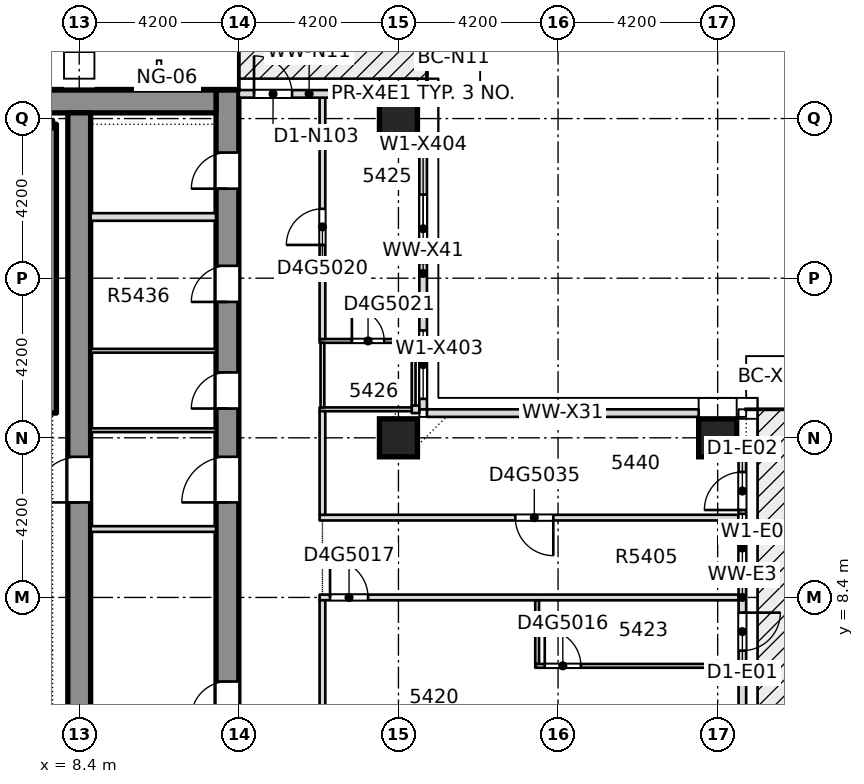
"""IFC4 building model, lengths in metres.
Left out: names, types, materials, properties, quantities, classifications, styles, units other than length and angle.
Written with IfcOpenShell. Run it as: python <this file> out.ifc"""

import sys

from ifc_helpers import new_model, si_unit, direction, frame, frame_2d, origin, origin_2d, place, context, subcontext, project, spatial, rectangle, extrude, element, fill, save


model = new_model("IFC4")
c1 = context("Model", 3, precision=1e-05, world=origin(), true_north=direction((0.0, 1.0)))
c2 = subcontext(c1, "Body", "Model", "MODEL_VIEW")
j1 = project(units=[si_unit("LENGTHUNIT", "METRE"), si_unit("PLANEANGLEUNIT", "RADIAN")], contexts=[c1])
p1 = place(None, origin())
s1 = spatial("IfcSite", under=j1, at=p1, CompositionType="ELEMENT")
p2 = place(p1, origin())
s2 = spatial("IfcBuilding", under=s1, at=p2, CompositionType="ELEMENT")
p3 = place(p2, frame((0.0, 0.0, 206.6)))
s3 = spatial("IfcBuildingStorey", under=s2, at=p3, CompositionType="ELEMENT", Elevation=206.6)
p4 = place(p3, frame((12.3, -8.4, -0.4), z_axis=(0.0, 0.0, 1.0), x_axis=(0.0, 1.0, 0.0)))
e1 = element("IfcWall", 1, at=p4, inside=s3, PredefinedType="SHEAR", context=c2, shape_type="SweptSolid", body=[
    extrude(rectangle(XDim=30.15, YDim=0.6, at=frame_2d((15.075, 0.0))), origin(), (0.0, 0.0, 1.0), 3.45),
])
p5 = place(p4, frame((4.788, 0.0, 0.4)))
e2 = element("IfcOpeningElement", 2, at=p5, cuts=e1, PredefinedType="OPENING", context=c2, shape_type="SweptSolid", body=[
    extrude(rectangle(XDim=0.95, YDim=2.1, at=frame_2d((0.475, 1.05))), frame((0.0, 0.31, 0.0), z_axis=(0.0, -1.0, 0.0), x_axis=(1.0, 0.0, 0.0)), (0.0, 0.0, 1.0), 0.62),
])
p6 = place(p4, frame((13.638, 0.0, 0.4)))
e3 = element("IfcOpeningElement", 3, at=p6, cuts=e1, PredefinedType="OPENING", context=c2, shape_type="SweptSolid", body=[
    extrude(rectangle(XDim=0.95, YDim=2.1, at=frame_2d((0.475, 1.05))), frame((0.0, 0.31, 0.0), z_axis=(0.0, -1.0, 0.0), x_axis=(1.0, 0.0, 0.0)), (0.0, 0.0, 1.0), 0.62),
])
p7 = place(p4, frame((21.771, 0.0, 0.4)))
e4 = element("IfcOpeningElement", 4, at=p7, cuts=e1, PredefinedType="OPENING", context=c2, shape_type="SweptSolid", body=[
    extrude(rectangle(XDim=0.95, YDim=2.1, at=frame_2d((0.475, 1.05))), frame((0.0, 0.31, 0.0), z_axis=(0.0, -1.0, 0.0), x_axis=(1.0, 0.0, 0.0)), (0.0, 0.0, 1.0), 0.62),
])
p8 = place(p4, frame((24.576, 0.0, 0.4)))
e5 = element("IfcOpeningElement", 5, at=p8, cuts=e1, PredefinedType="OPENING", context=c2, shape_type="SweptSolid", body=[
    extrude(rectangle(XDim=0.95, YDim=2.1, at=frame_2d((0.475, 1.05))), frame((0.0, 0.31, 0.0), z_axis=(0.0, -1.0, 0.0), x_axis=(1.0, 0.0, 0.0)), (0.0, 0.0, 1.0), 0.62),
])
p9 = place(p4, frame((27.555, 0.0, 0.4)))
e6 = element("IfcOpeningElement", 6, at=p9, cuts=e1, PredefinedType="OPENING", context=c2, shape_type="SweptSolid", body=[
    extrude(rectangle(XDim=0.95, YDim=2.1, at=frame_2d((0.475, 1.05))), frame((0.0, 0.31, 0.0), z_axis=(0.0, -1.0, 0.0), x_axis=(1.0, 0.0, 0.0)), (0.0, 0.0, 1.0), 0.62),
])
p10 = place(p4, frame((19.3, 0.0, 0.4)))
e7 = element("IfcOpeningElement", 7, at=p10, cuts=e1, PredefinedType="OPENING", context=c2, shape_type="SweptSolid", body=[
    extrude(rectangle(XDim=1.2, YDim=2.1, at=frame_2d((0.6, 1.05))), frame((0.0, 0.31, 0.0), z_axis=(0.0, -1.0, 0.0), x_axis=(1.0, 0.0, 0.0)), (0.0, 0.0, 1.0), 0.62),
])
p11 = place(p3, frame((-12.0, 21.45, -0.4), z_axis=(0.0, 0.0, 1.0), x_axis=(1.0, 0.0, 0.0)))
e8 = element("IfcWall", 8, at=p11, inside=s3, PredefinedType="SHEAR", context=c2, shape_type="SweptSolid", body=[
    extrude(rectangle(XDim=24.0, YDim=0.6, at=frame_2d((12.0, 0.0))), origin(), (0.0, 0.0, 1.0), 3.45),
])
p12 = place(p3, frame((8.4, -7.8, -0.4), z_axis=(0.0, 0.0, 1.0), x_axis=(0.0, 1.0, 0.0)))
e9 = element("IfcWall", 9, at=p12, inside=s3, PredefinedType="SHEAR", context=c2, shape_type="SweptSolid", body=[
    extrude(rectangle(XDim=28.95, YDim=0.6, at=frame_2d((14.475, 0.0))), origin(), (0.0, 0.0, 1.0), 3.45),
])
p13 = place(p12, frame((18.7, 0.0, 0.4)))
e10 = element("IfcOpeningElement", 10, at=p13, cuts=e9, PredefinedType="OPENING", context=c2, shape_type="SweptSolid", body=[
    extrude(rectangle(XDim=1.2, YDim=2.1, at=frame_2d((0.6, 1.05))), frame((0.0, 0.31, 0.0), z_axis=(0.0, -1.0, 0.0), x_axis=(1.0, 0.0, 0.0)), (0.0, 0.0, 1.0), 0.62),
])
for number, where, z_axis, x_axis in (
    (11, (16.8, 12.6, -0.4), (0.0, 0.0, 1.0), (1.0, 0.0, 0.0)),
    (12, (25.2, 12.6, -0.4), (0.0, 0.0, 1.0), (1.0, 0.0, 0.0)),
    (13, (16.8, 21.0, -0.4), (0.0, 0.0, 1.0), (1.0, 0.0, 0.0)),
):
    element("IfcColumn", number, at=place(p3, frame(where, z_axis=z_axis, x_axis=x_axis)), inside=s3, PredefinedType="COLUMN", context=c2, shape_type="SweptSolid", body=[
        extrude(rectangle(XDim=1.0, YDim=1.0, at=origin_2d()), origin(), (0.0, 0.0, 1.0), 3.45),
    ])
p14 = place(p3, frame((20.4, 6.6, 0.0), z_axis=(0.0, 0.0, 1.0), x_axis=(1.0, 0.0, 0.0)))
e14 = element("IfcWall", 14, at=p14, inside=s3, PredefinedType="PARTITIONING", context=c2, shape_type="SweptSolid", body=[
    extrude(rectangle(XDim=5.35, YDim=0.1, at=frame_2d((2.675, 0.0))), origin(), (0.0, 0.0, 1.0), 3.05),
])
p15 = place(p14, frame((0.25, 0.0, 0.0)))
e15 = element("IfcOpeningElement", 15, at=p15, cuts=e14, PredefinedType="OPENING", context=c2, shape_type="SweptSolid", body=[
    extrude(rectangle(XDim=0.95, YDim=2.1, at=frame_2d((0.475, 1.05))), frame((0.0, 0.06, 0.0), z_axis=(0.0, -1.0, 0.0), x_axis=(1.0, 0.0, 0.0)), (0.0, 0.0, 1.0), 0.12),
])
p16 = place(p3, frame((14.725, 8.4, 0.0), z_axis=(0.0, 0.0, 1.0), x_axis=(1.0, 0.0, 0.0)))
e16 = element("IfcWall", 16, at=p16, inside=s3, PredefinedType="PARTITIONING", context=c2, shape_type="SweptSolid", body=[
    extrude(rectangle(XDim=11.025, YDim=0.15, at=frame_2d((5.512, 0.0))), origin(), (0.0, 0.0, 1.0), 3.05),
])
p17 = place(p16, frame((0.275, 0.0, 0.0)))
e17 = element("IfcOpeningElement", 17, at=p17, cuts=e16, PredefinedType="OPENING", context=c2, shape_type="SweptSolid", body=[
    extrude(rectangle(XDim=1.0, YDim=2.1, at=frame_2d((0.5, 1.05))), frame((0.0, 0.085, 0.0), z_axis=(0.0, -1.0, 0.0), x_axis=(1.0, 0.0, 0.0)), (0.0, 0.0, 1.0), 0.17),
])
p18 = place(p3, frame((14.725, 10.5, 0.0), z_axis=(0.0, 0.0, 1.0), x_axis=(1.0, 0.0, 0.0)))
e18 = element("IfcWall", 18, at=p18, inside=s3, PredefinedType="PARTITIONING", context=c2, shape_type="SweptSolid", body=[
    extrude(rectangle(XDim=11.025, YDim=0.15, at=frame_2d((5.512, 0.0))), origin(), (0.0, 0.0, 1.0), 3.05),
])
p19 = place(p18, frame((5.15, 0.0, 0.0)))
e19 = element("IfcOpeningElement", 19, at=p19, cuts=e18, PredefinedType="OPENING", context=c2, shape_type="SweptSolid", body=[
    extrude(rectangle(XDim=1.0, YDim=2.1, at=frame_2d((0.5, 1.05))), frame((0.0, 0.085, 0.0), z_axis=(0.0, -1.0, 0.0), x_axis=(1.0, 0.0, 0.0)), (0.0, 0.0, 1.0), 0.17),
])
p20 = place(p3, frame((14.725, 13.35, 0.0), z_axis=(0.0, 0.0, 1.0), x_axis=(1.0, 0.0, 0.0)))
e20 = element("IfcWall", 20, at=p20, inside=s3, PredefinedType="PARTITIONING", context=c2, shape_type="SweptSolid", body=[
    extrude(rectangle(XDim=2.525, YDim=0.1, at=frame_2d((1.262, 0.0))), origin(), (0.0, 0.0, 1.0), 3.05),
])
p21 = place(p3, frame((17.15, 13.35, 0.0), z_axis=(0.0, 0.0, 1.0), x_axis=(1.0, 0.0, 0.0)))
e21 = element("IfcWall", 21, at=p21, inside=s3, PredefinedType="PARTITIONING", context=c2, shape_type="SweptSolid", body=[
    extrude(rectangle(XDim=0.2, YDim=0.2, at=frame_2d((0.1, 0.0))), origin(), (0.0, 0.0, 1.0), 3.05),
])
p22 = place(p3, frame((14.725, 15.15, 0.0), z_axis=(0.0, 0.0, 1.0), x_axis=(1.0, 0.0, 0.0)))
e22 = element("IfcWall", 22, at=p22, inside=s3, PredefinedType="PARTITIONING", context=c2, shape_type="SweptSolid", body=[
    extrude(rectangle(XDim=2.525, YDim=0.1, at=frame_2d((1.262, 0.0))), origin(), (0.0, 0.0, 1.0), 3.05),
])
p23 = place(p22, frame((0.85, 0.0, 0.0)))
e23 = element("IfcOpeningElement", 23, at=p23, cuts=e22, PredefinedType="OPENING", context=c2, shape_type="SweptSolid", body=[
    extrude(rectangle(XDim=0.85, YDim=2.1, at=frame_2d((0.425, 1.05))), frame((0.0, 0.06, 0.0), z_axis=(0.0, -1.0, 0.0), x_axis=(1.0, 0.0, 0.0)), (0.0, 0.0, 1.0), 0.12),
])
p24 = place(p3, frame((14.8, -10.18, 0.0), z_axis=(0.0, 0.0, 1.0), x_axis=(0.0, 1.0, 0.0)))
e24 = element("IfcWall", 24, at=p24, inside=s3, PredefinedType="PARTITIONING", context=c2, shape_type="SweptSolid", body=[
    extrude(rectangle(XDim=18.505, YDim=0.15, at=frame_2d((9.252, 0.0))), origin(), (0.0, 0.0, 1.0), 3.05),
])
p25 = place(p24, frame((0.63, 0.0, 0.0)))
e25 = element("IfcOpeningElement", 25, at=p25, cuts=e24, PredefinedType="OPENING", context=c2, shape_type="SweptSolid", body=[
    extrude(rectangle(XDim=0.95, YDim=2.1, at=frame_2d((0.475, 1.05))), frame((0.0, 0.085, 0.0), z_axis=(0.0, -1.0, 0.0), x_axis=(1.0, 0.0, 0.0)), (0.0, 0.0, 1.0), 0.17),
])
p26 = place(p24, frame((9.63, 0.0, 0.0)))
e26 = element("IfcOpeningElement", 26, at=p26, cuts=e24, PredefinedType="OPENING", context=c2, shape_type="SweptSolid", body=[
    extrude(rectangle(XDim=1.1, YDim=2.1, at=frame_2d((0.55, 1.05))), frame((0.0, 0.085, 0.0), z_axis=(0.0, -1.0, 0.0), x_axis=(1.0, 0.0, 0.0)), (0.0, 0.0, 1.0), 0.17),
])
p27 = place(p24, frame((4.48, 0.0, 0.0)))
e27 = element("IfcOpeningElement", 27, at=p27, cuts=e24, PredefinedType="OPENING", context=c2, shape_type="SweptSolid", body=[
    extrude(rectangle(XDim=1.0, YDim=2.1, at=frame_2d((0.5, 1.05))), frame((0.0, 0.085, 0.0), z_axis=(0.0, -1.0, 0.0), x_axis=(1.0, 0.0, 0.0)), (0.0, 0.0, 1.0), 0.17),
])
p28 = place(p3, frame((14.8, 10.575, 0.0), z_axis=(0.0, 0.0, 1.0), x_axis=(0.0, 1.0, 0.0)))
e28 = element("IfcWall", 28, at=p28, inside=s3, PredefinedType="PARTITIONING", context=c2, shape_type="SweptSolid", body=[
    extrude(rectangle(XDim=2.725, YDim=0.15, at=frame_2d((1.363, 0.0))), origin(), (0.0, 0.0, 1.0), 3.05),
])
p29 = place(p3, frame((14.8, 13.4, 0.0), z_axis=(0.0, 0.0, 1.0), x_axis=(0.0, 1.0, 0.0)))
e29 = element("IfcWall", 29, at=p29, inside=s3, PredefinedType="PARTITIONING", context=c2, shape_type="SweptSolid", body=[
    extrude(rectangle(XDim=1.7, YDim=0.1, at=frame_2d((0.85, 0.0))), origin(), (0.0, 0.0, 1.0), 3.05),
])
p30 = place(p3, frame((14.8, 15.2, 0.0), z_axis=(0.0, 0.0, 1.0), x_axis=(0.0, 1.0, 0.0)))
e30 = element("IfcWall", 30, at=p30, inside=s3, PredefinedType="PARTITIONING", context=c2, shape_type="SweptSolid", body=[
    extrude(rectangle(XDim=6.35, YDim=0.15, at=frame_2d((3.175, 0.0))), origin(), (0.0, 0.0, 1.0), 3.05),
])
p31 = place(p30, frame((2.475, 0.0, 0.0)))
e31 = element("IfcOpeningElement", 31, at=p31, cuts=e30, PredefinedType="OPENING", context=c2, shape_type="SweptSolid", body=[
    extrude(rectangle(XDim=0.95, YDim=2.1, at=frame_2d((0.475, 1.05))), frame((0.0, 0.085, 0.0), z_axis=(0.0, -1.0, 0.0), x_axis=(1.0, 0.0, 0.0)), (0.0, 0.0, 1.0), 0.17),
])
p32 = place(p3, frame((17.2, 13.45, 0.0), z_axis=(0.0, 0.0, 1.0), x_axis=(0.0, 1.0, 0.0)))
e32 = element("IfcWall", 32, at=p32, inside=s3, PredefinedType="PARTITIONING", context=c2, shape_type="SweptSolid", body=[
    extrude(rectangle(XDim=1.65, YDim=0.1, at=frame_2d((0.825, 0.0))), origin(), (0.0, 0.0, 1.0), 3.05),
])
p33 = place(p3, frame((20.45, 6.65, 0.0), z_axis=(0.0, 0.0, 1.0), x_axis=(0.0, 1.0, 0.0)))
e33 = element("IfcWall", 33, at=p33, inside=s3, PredefinedType="PARTITIONING", context=c2, shape_type="SweptSolid", body=[
    extrude(rectangle(XDim=1.675, YDim=0.1, at=frame_2d((0.837, 0.0))), origin(), (0.0, 0.0, 1.0), 3.05),
])
p34 = place(p3, frame((25.85, 4.7, 0.0), z_axis=(0.0, 0.0, 1.0), x_axis=(0.0, 1.0, 0.0)))
e34 = element("IfcWall", 34, at=p34, inside=s3, PredefinedType="STANDARD", context=c2, shape_type="SweptSolid", body=[
    extrude(rectangle(XDim=7.4, YDim=0.2, at=frame_2d((3.7, 0.0))), origin(), (0.0, 0.0, 1.0), 3.05),
])
p35 = place(p34, frame((2.3, 0.0, 0.0)))
e35 = element("IfcOpeningElement", 35, at=p35, cuts=e34, PredefinedType="OPENING", context=c2, shape_type="SweptSolid", body=[
    extrude(rectangle(XDim=1.0, YDim=2.4, at=frame_2d((0.5, 1.2))), frame((0.0, 0.11, 0.0), z_axis=(0.0, -1.0, 0.0), x_axis=(1.0, 0.0, 0.0)), (0.0, 0.0, 1.0), 0.22),
])
p36 = place(p34, frame((4.1, 0.0, 0.2)))
e36 = element("IfcOpeningElement", 36, at=p36, cuts=e34, PredefinedType="OPENING", context=c2, shape_type="SweptSolid", body=[
    extrude(rectangle(XDim=1.8, YDim=2.65, at=frame_2d((0.9, 1.325))), frame((0.0, 0.11, 0.0), z_axis=(0.0, -1.0, 0.0), x_axis=(1.0, 0.0, 0.0)), (0.0, 0.0, 1.0), 0.22),
])
p37 = place(p34, frame((6.0, 0.0, 0.0)))
e37 = element("IfcOpeningElement", 37, at=p37, cuts=e34, PredefinedType="OPENING", context=c2, shape_type="SweptSolid", body=[
    extrude(rectangle(XDim=1.0, YDim=2.4, at=frame_2d((0.5, 1.2))), frame((0.0, 0.11, 0.0), z_axis=(0.0, -1.0, 0.0), x_axis=(1.0, 0.0, 0.0)), (0.0, 0.0, 1.0), 0.22),
])
p38 = place(p3, frame((24.7, 13.25, 0.0), z_axis=(0.0, 0.0, 1.0), x_axis=(-1.0, 0.0, 0.0)))
e38 = element("IfcWall", 38, at=p38, inside=s3, PredefinedType="STANDARD", context=c2, shape_type="SweptSolid", body=[
    extrude(rectangle(XDim=7.15, YDim=0.2, at=frame_2d((3.575, 0.0))), origin(), (0.0, 0.0, 1.0), 3.05),
])
p39 = place(p3, frame((17.45, 13.35, 0.0), z_axis=(0.0, 0.0, 1.0), x_axis=(0.0, 1.0, 0.0)))
e39 = element("IfcWall", 39, at=p39, inside=s3, PredefinedType="STANDARD", context=c2, shape_type="SweptSolid", body=[
    extrude(rectangle(XDim=7.15, YDim=0.2, at=frame_2d((3.575, 0.0))), origin(), (0.0, 0.0, 1.0), 3.05),
])
p40 = place(p39, frame((0.275, 0.0, 0.2)))
e40 = element("IfcOpeningElement", 40, at=p40, cuts=e39, PredefinedType="OPENING", context=c2, shape_type="SweptSolid", body=[
    extrude(rectangle(XDim=1.8, YDim=2.65, at=frame_2d((0.9, 1.325))), frame((0.0, 0.11, 0.0), z_axis=(0.0, -1.0, 0.0), x_axis=(1.0, 0.0, 0.0)), (0.0, 0.0, 1.0), 0.22),
])
p41 = place(p39, frame((3.85, 0.0, 0.2)))
e41 = element("IfcOpeningElement", 41, at=p41, cuts=e39, PredefinedType="OPENING", context=c2, shape_type="SweptSolid", body=[
    extrude(rectangle(XDim=1.8, YDim=2.65, at=frame_2d((0.9, 1.325))), frame((0.0, 0.11, 0.0), z_axis=(0.0, -1.0, 0.0), x_axis=(1.0, 0.0, 0.0)), (0.0, 0.0, 1.0), 0.22),
])
p42 = place(p3, frame((16.3, 21.65, 0.0), z_axis=(0.0, 0.0, 1.0), x_axis=(-1.0, 0.0, 0.0)))
e42 = element("IfcWall", 42, at=p42, inside=s3, PredefinedType="STANDARD", context=c2, shape_type="SweptSolid", body=[
    extrude(rectangle(XDim=3.7, YDim=0.2, at=frame_2d((1.85, 0.0))), origin(), (0.0, 0.0, 1.0), 3.05),
])
p43 = place(p42, frame((2.3, 0.0, 0.0)))
e43 = element("IfcOpeningElement", 43, at=p43, cuts=e42, PredefinedType="OPENING", context=c2, shape_type="SweptSolid", body=[
    extrude(rectangle(XDim=1.0, YDim=2.4, at=frame_2d((0.5, 1.2))), frame((0.0, 0.11, 0.0), z_axis=(0.0, -1.0, 0.0), x_axis=(1.0, 0.0, 0.0)), (0.0, 0.0, 1.0), 0.22),
])
p44 = place(p3, frame((8.701, 10.2, 0.0), z_axis=(0.0, 0.0, 1.0), x_axis=(1.0, 0.0, 0.0)))
e44 = element("IfcWall", 44, at=p44, inside=s3, PredefinedType="PARTITIONING", context=c2, shape_type="SweptSolid", body=[
    extrude(rectangle(XDim=3.298, YDim=0.15, at=frame_2d((1.649, 0.0))), origin(), (0.0, 0.0, 1.0), 3.05),
])
for number, where, z_axis, x_axis in (
    (45, (8.701, 12.8, 0.0), (0.0, 0.0, 1.0), (1.0, 0.0, 0.0)),
    (46, (8.701, 14.891, 0.0), (0.0, 0.0, 1.0), (1.0, 0.0, 0.0)),
):
    element("IfcWall", number, at=place(p3, frame(where, z_axis=z_axis, x_axis=x_axis)), inside=s3, PredefinedType="PARTITIONING", context=c2, shape_type="SweptSolid", body=[
        extrude(rectangle(XDim=3.298, YDim=0.1, at=frame_2d((1.649, 0.0))), origin(), (0.0, 0.0, 1.0), 3.05),
    ])
p45 = place(p3, frame((8.701, 18.411, 0.0), z_axis=(0.0, 0.0, 1.0), x_axis=(1.0, 0.0, 0.0)))
e47 = element("IfcWall", 47, at=p45, inside=s3, PredefinedType="PARTITIONING", context=c2, shape_type="SweptSolid", body=[
    extrude(rectangle(XDim=3.298, YDim=0.2, at=frame_2d((1.649, 0.0))), origin(), (0.0, 0.0, 1.0), 3.05),
])
p46 = place(p3, frame((7.7, 13.25, 0.0), z_axis=(0.0, 0.0, 1.0), x_axis=(0.0, 1.0, 0.0)))
e48 = element("IfcWall", 48, at=p46, inside=s3, PredefinedType="SOLIDWALL", context=c2, shape_type="SweptSolid", body=[
    extrude(rectangle(XDim=7.6, YDim=0.2, at=frame_2d((3.8, 0.0))), origin(), (0.0, 0.0, 1.0), 3.05),
])
p47 = place(p15, origin())
e49 = element("IfcDoor", 49, at=p47, inside=s3, OperationType="SINGLE_SWING_LEFT", PredefinedType="DOOR", context=c2, shape_type="SweptSolid", body=[
    extrude(rectangle(XDim=0.95, YDim=2.1, at=frame_2d((0.475, 1.05))), frame((0.0, 0.025, 0.0), z_axis=(0.0, -1.0, 0.0), x_axis=(1.0, 0.0, 0.0)), (0.0, 0.0, 1.0), 0.05),
])
fill(e15, e49)
p48 = place(p17, origin())
e50 = element("IfcDoor", 50, at=p48, inside=s3, OperationType="SINGLE_SWING_RIGHT", PredefinedType="DOOR", context=c2, shape_type="SweptSolid", body=[
    extrude(rectangle(XDim=1.0, YDim=2.1, at=frame_2d((0.5, 1.05))), frame((0.0, 0.025, 0.0), z_axis=(0.0, -1.0, 0.0), x_axis=(1.0, 0.0, 0.0)), (0.0, 0.0, 1.0), 0.05),
])
fill(e17, e50)
p49 = place(p31, origin())
e51 = element("IfcDoor", 51, at=p49, inside=s3, OperationType="SINGLE_SWING_LEFT", PredefinedType="DOOR", context=c2, shape_type="SweptSolid", body=[
    extrude(rectangle(XDim=0.95, YDim=2.1, at=frame_2d((0.475, 1.05))), frame((0.0, 0.025, 0.0), z_axis=(0.0, -1.0, 0.0), x_axis=(1.0, 0.0, 0.0)), (0.0, 0.0, 1.0), 0.05),
])
fill(e31, e51)
p50 = place(p23, origin())
e52 = element("IfcDoor", 52, at=p50, inside=s3, OperationType="SINGLE_SWING_RIGHT", PredefinedType="DOOR", context=c2, shape_type="SweptSolid", body=[
    extrude(rectangle(XDim=0.85, YDim=2.1, at=frame_2d((0.425, 1.05))), frame((0.0, 0.025, 0.0), z_axis=(0.0, -1.0, 0.0), x_axis=(1.0, 0.0, 0.0)), (0.0, 0.0, 1.0), 0.05),
])
fill(e23, e52)
p51 = place(p19, origin())
e53 = element("IfcDoor", 53, at=p51, inside=s3, OperationType="SINGLE_SWING_RIGHT", PredefinedType="DOOR", context=c2, shape_type="SweptSolid", body=[
    extrude(rectangle(XDim=1.0, YDim=2.1, at=frame_2d((0.5, 1.05))), frame((0.0, 0.025, 0.0), z_axis=(0.0, -1.0, 0.0), x_axis=(1.0, 0.0, 0.0)), (0.0, 0.0, 1.0), 0.05),
])
fill(e19, e53)
p52 = place(p35, origin())
e54 = element("IfcDoor", 54, at=p52, inside=s3, OperationType="SINGLE_SWING_LEFT", PredefinedType="DOOR", context=c2, shape_type="SweptSolid", body=[
    extrude(rectangle(XDim=1.0, YDim=2.4, at=frame_2d((0.5, 1.2))), frame((0.0, 0.025, 0.0), z_axis=(0.0, -1.0, 0.0), x_axis=(1.0, 0.0, 0.0)), (0.0, 0.0, 1.0), 0.05),
])
fill(e35, e54)
p53 = place(p36, origin())
e55 = element("IfcWindow", 55, at=p53, inside=s3, PartitioningType="SINGLE_PANEL", PredefinedType="WINDOW", context=c2, shape_type="SweptSolid", body=[
    extrude(rectangle(XDim=1.8, YDim=2.65, at=frame_2d((0.9, 1.325))), frame((0.0, 0.03, 0.0), z_axis=(0.0, -1.0, 0.0), x_axis=(1.0, 0.0, 0.0)), (0.0, 0.0, 1.0), 0.06),
])
fill(e36, e55)
p54 = place(p37, origin())
e56 = element("IfcDoor", 56, at=p54, inside=s3, OperationType="SINGLE_SWING_LEFT", PredefinedType="DOOR", context=c2, shape_type="SweptSolid", body=[
    extrude(rectangle(XDim=1.0, YDim=2.4, at=frame_2d((0.5, 1.2))), frame((0.0, 0.025, 0.0), z_axis=(0.0, -1.0, 0.0), x_axis=(1.0, 0.0, 0.0)), (0.0, 0.0, 1.0), 0.05),
])
fill(e37, e56)
p55 = place(p40, origin())
e57 = element("IfcWindow", 57, at=p55, inside=s3, PartitioningType="SINGLE_PANEL", PredefinedType="WINDOW", context=c2, shape_type="SweptSolid", body=[
    extrude(rectangle(XDim=1.8, YDim=2.65, at=frame_2d((0.9, 1.325))), frame((0.0, 0.03, 0.0), z_axis=(0.0, -1.0, 0.0), x_axis=(1.0, 0.0, 0.0)), (0.0, 0.0, 1.0), 0.06),
])
fill(e40, e57)
p56 = place(p41, origin())
e58 = element("IfcWindow", 58, at=p56, inside=s3, PartitioningType="SINGLE_PANEL", PredefinedType="WINDOW", context=c2, shape_type="SweptSolid", body=[
    extrude(rectangle(XDim=1.8, YDim=2.65, at=frame_2d((0.9, 1.325))), frame((0.0, 0.03, 0.0), z_axis=(0.0, -1.0, 0.0), x_axis=(1.0, 0.0, 0.0)), (0.0, 0.0, 1.0), 0.06),
])
fill(e41, e58)
p57 = place(p43, origin())
e59 = element("IfcDoor", 59, at=p57, inside=s3, OperationType="SINGLE_SWING_LEFT", PredefinedType="DOOR", context=c2, shape_type="SweptSolid", body=[
    extrude(rectangle(XDim=1.0, YDim=2.4, at=frame_2d((0.5, 1.2))), frame((0.0, 0.025, 0.0), z_axis=(0.0, -1.0, 0.0), x_axis=(1.0, 0.0, 0.0)), (0.0, 0.0, 1.0), 0.05),
])
fill(e43, e59)
p58 = place(p6, origin())
e60 = element("IfcDoor", 60, at=p58, inside=s3, OperationType="SINGLE_SWING_LEFT", PredefinedType="DOOR", context=c2, shape_type="SweptSolid", body=[
    extrude(rectangle(XDim=0.95, YDim=2.1, at=frame_2d((0.475, 1.05))), frame((0.0, 0.025, 0.0), z_axis=(0.0, -1.0, 0.0), x_axis=(1.0, 0.0, 0.0)), (0.0, 0.0, 1.0), 0.05),
])
fill(e3, e60)
p59 = place(p7, origin())
e61 = element("IfcDoor", 61, at=p59, inside=s3, OperationType="SINGLE_SWING_LEFT", PredefinedType="DOOR", context=c2, shape_type="SweptSolid", body=[
    extrude(rectangle(XDim=0.95, YDim=2.1, at=frame_2d((0.475, 1.05))), frame((0.0, 0.025, 0.0), z_axis=(0.0, -1.0, 0.0), x_axis=(1.0, 0.0, 0.0)), (0.0, 0.0, 1.0), 0.05),
])
fill(e4, e61)
p60 = place(p8, origin())
e62 = element("IfcDoor", 62, at=p60, inside=s3, OperationType="SINGLE_SWING_LEFT", PredefinedType="DOOR", context=c2, shape_type="SweptSolid", body=[
    extrude(rectangle(XDim=0.95, YDim=2.1, at=frame_2d((0.475, 1.05))), frame((0.0, 0.025, 0.0), z_axis=(0.0, -1.0, 0.0), x_axis=(1.0, 0.0, 0.0)), (0.0, 0.0, 1.0), 0.05),
])
fill(e5, e62)
p61 = place(p9, origin())
e63 = element("IfcDoor", 63, at=p61, inside=s3, OperationType="SINGLE_SWING_LEFT", PredefinedType="DOOR", context=c2, shape_type="SweptSolid", body=[
    extrude(rectangle(XDim=0.95, YDim=2.1, at=frame_2d((0.475, 1.05))), frame((0.0, 0.025, 0.0), z_axis=(0.0, -1.0, 0.0), x_axis=(1.0, 0.0, 0.0)), (0.0, 0.0, 1.0), 0.05),
])
fill(e6, e63)
p62 = place(p10, origin())
e64 = element("IfcDoor", 64, at=p62, inside=s3, OperationType="SINGLE_SWING_LEFT", PredefinedType="DOOR", context=c2, shape_type="SweptSolid", body=[
    extrude(rectangle(XDim=1.2, YDim=2.1, at=frame_2d((0.6, 1.05))), frame((0.0, 0.025, 0.0), z_axis=(0.0, -1.0, 0.0), x_axis=(1.0, 0.0, 0.0)), (0.0, 0.0, 1.0), 0.05),
])
fill(e7, e64)
p63 = place(p13, origin())
e65 = element("IfcDoor", 65, at=p63, inside=s3, OperationType="SINGLE_SWING_LEFT", PredefinedType="DOOR", context=c2, shape_type="SweptSolid", body=[
    extrude(rectangle(XDim=1.2, YDim=2.1, at=frame_2d((0.6, 1.05))), frame((0.0, 0.025, 0.0), z_axis=(0.0, -1.0, 0.0), x_axis=(1.0, 0.0, 0.0)), (0.0, 0.0, 1.0), 0.05),
])
fill(e10, e65)
save(model, sys.argv[1])
